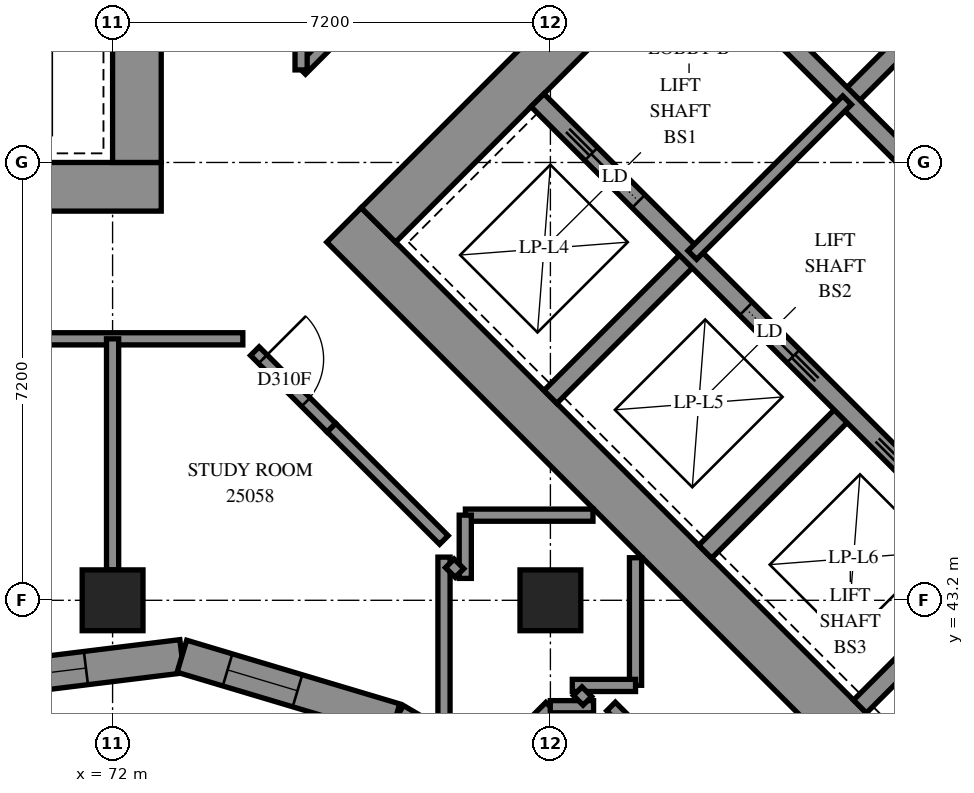
"""IFC4 building model, lengths in metres.
Left out: names, types, materials, properties, quantities, classifications, styles, units other than length and angle.
Written with IfcOpenShell. Run it as: python <this file> out.ifc"""

import sys

from ifc_helpers import new_model, si_unit, direction, frame, frame_2d, origin, origin_2d, place, context, subcontext, project, spatial, polyline, rectangle, outline, extrude, element, fill, save


model = new_model("IFC4")
c1 = context("Model", 3, precision=1e-05, world=origin(), true_north=direction((0.0, 1.0)))
c2 = subcontext(c1, "Body", "Model", "MODEL_VIEW")
j1 = project(units=[si_unit("LENGTHUNIT", "METRE"), si_unit("PLANEANGLEUNIT", "RADIAN")], contexts=[c1])
p1 = place(None, origin())
s1 = spatial("IfcSite", under=j1, at=p1, CompositionType="ELEMENT")
p2 = place(p1, origin())
s2 = spatial("IfcBuilding", under=s1, at=p2, CompositionType="ELEMENT")
p3 = place(p2, frame((0.0, 0.0, 94.8)))
s3 = spatial("IfcBuildingStorey", under=s2, at=p3, CompositionType="ELEMENT", Elevation=94.8)
for number, where, z_axis, x_axis in (
    (1, (72.0, 43.2, 0.0), (0.0, 0.0, 1.0), (1.0, 0.0, 0.0)),
    (2, (79.2, 43.2, 0.0), (0.0, 0.0, 1.0), (1.0, 0.0, 0.0)),
):
    element("IfcColumn", number, at=place(p3, frame(where, z_axis=z_axis, x_axis=x_axis)), inside=s3, PredefinedType="COLUMN", context=c2, shape_type="SweptSolid", body=[
        extrude(rectangle(XDim=1.0, YDim=1.0, at=origin_2d()), origin(), (0.0, 0.0, 1.0), 3.1),
    ])
p4 = place(p3, frame((56.8, 50.0, -0.3), z_axis=(0.0, 0.0, 1.0), x_axis=(1.0, 0.0, 0.0)))
e3 = element("IfcWall", 3, at=p4, inside=s3, PredefinedType="SHEAR", context=c2, shape_type="SweptSolid", body=[
    extrude(rectangle(XDim=16.0, YDim=0.8, at=frame_2d((8.0, 0.0))), origin(), (0.0, 0.0, 1.0), 2.7),
])
p5 = place(p3, frame((72.4, 50.4, -0.3), z_axis=(0.0, 0.0, 1.0), x_axis=(0.0, 1.0, 0.0)))
e4 = element("IfcWall", 4, at=p5, inside=s3, PredefinedType="SHEAR", context=c2, shape_type="SweptSolid", body=[
    extrude(rectangle(XDim=14.4, YDim=0.8, at=frame_2d((7.2, 0.0))), origin(), (0.0, 0.0, 1.0), 2.7),
])
p6 = place(p5, frame((4.55, 0.0, 0.3)))
e5 = element("IfcOpeningElement", 5, at=p6, cuts=e4, PredefinedType="OPENING", context=c2, shape_type="SweptSolid", body=[
    extrude(rectangle(XDim=1.1, YDim=2.1, at=frame_2d((0.55, 1.05))), frame((0.0, 0.41, 0.0), z_axis=(0.0, -1.0, 0.0), x_axis=(1.0, 0.0, 0.0)), (0.0, 0.0, 1.0), 0.82),
])
p7 = place(p5, frame((11.35, 0.0, 0.3)))
e6 = element("IfcOpeningElement", 6, at=p7, cuts=e4, PredefinedType="OPENING", context=c2, shape_type="SweptSolid", body=[
    extrude(rectangle(XDim=1.1, YDim=2.1, at=frame_2d((0.55, 1.05))), frame((0.0, 0.41, 0.0), z_axis=(0.0, -1.0, 0.0), x_axis=(1.0, 0.0, 0.0)), (0.0, 0.0, 1.0), 0.82),
])
p8 = place(p3, frame((75.806, 49.373, -0.3), z_axis=(0.0, 0.0, 1.0), x_axis=(0.7071067812, -0.7071067812, 0.0)))
e7 = element("IfcWall", 7, at=p8, inside=s3, PredefinedType="SHEAR", context=c2, shape_type="SweptSolid", body=[
    extrude(rectangle(XDim=16.0, YDim=0.8, at=frame_2d((8.0, 0.0))), origin(), (0.0, 0.0, 1.0), 2.7),
])
p9 = place(p3, frame((76.372, 49.373, -0.3), z_axis=(0.0, 0.0, 1.0), x_axis=(0.7071067812, 0.7071067812, 0.0)))
e8 = element("IfcWall", 8, at=p9, inside=s3, PredefinedType="SHEAR", context=c2, shape_type="SweptSolid", body=[
    extrude(rectangle(XDim=14.4, YDim=0.8, at=frame_2d((7.2, 0.0))), origin(), (0.0, 0.0, 1.0), 2.7),
])
p10 = place(p9, frame((4.55, 0.0, 0.3)))
e9 = element("IfcOpeningElement", 9, at=p10, cuts=e8, PredefinedType="OPENING", context=c2, shape_type="SweptSolid", body=[
    extrude(rectangle(XDim=1.1, YDim=2.1, at=frame_2d((0.55, 1.05))), frame((0.0, 0.41, 0.0), z_axis=(0.0, -1.0, 0.0), x_axis=(1.0, 0.0, 0.0)), (0.0, 0.0, 1.0), 0.82),
])
p11 = place(p9, frame((11.35, 0.0, 0.3)))
e10 = element("IfcOpeningElement", 10, at=p11, cuts=e8, PredefinedType="OPENING", context=c2, shape_type="SweptSolid", body=[
    extrude(rectangle(XDim=1.1, YDim=2.1, at=frame_2d((0.55, 1.05))), frame((0.0, 0.41, 0.0), z_axis=(0.0, -1.0, 0.0), x_axis=(1.0, 0.0, 0.0)), (0.0, 0.0, 1.0), 0.82),
])
for number, where, z_axis, x_axis in (
    (11, (79.2, 46.544, 0.0), (0.0, 0.0, 1.0), (0.707, 0.707, 0.0)),
    (12, (84.079, 51.423, 0.0), (0.0, 0.0, 1.0), (0.707, 0.707, 0.0)),
):
    element("IfcWall", number, at=place(p3, frame(where, z_axis=z_axis, x_axis=x_axis)), inside=s3, PredefinedType="SOLIDWALL", context=c2, shape_type="SweptSolid", body=[
        extrude(rectangle(XDim=3.3, YDim=0.3, at=frame_2d((1.65, 0.0))), origin(), (0.0, 0.0, 1.0), 3.1),
    ])
for number, where, z_axis, x_axis in (
    (13, (81.746, 43.999, 0.0), (0.0, 0.0, 1.0), (0.707, 0.707, 0.0)),
    (14, (84.291, 41.453, 0.0), (0.0, 0.0, 1.0), (0.707, 0.707, 0.0)),
):
    element("IfcWall", number, at=place(p3, frame(where, z_axis=z_axis, x_axis=x_axis)), inside=s3, PredefinedType="SOLIDWALL", context=c2, shape_type="SweptSolid", body=[
        extrude(rectangle(XDim=3.3, YDim=0.3, at=frame_2d((1.65, 0.0))), origin(), (0.0, 0.0, 1.0), 3.1),
    ])
p12 = place(p3, frame((78.988, 51.423, 0.0), z_axis=(0.0, 0.0, 1.0), x_axis=(0.7071067812, -0.7071067812, 0.0)))
e15 = element("IfcWall", 15, at=p12, inside=s3, PredefinedType="SOLIDWALL", context=c2, shape_type="SweptSolid", body=[
    extrude(rectangle(XDim=14.4, YDim=0.3, at=frame_2d((7.2, 0.0))), origin(), (0.0, 0.0, 1.0), 3.1),
])
p13 = place(p12, frame((1.25, 0.0, 0.0)))
e16 = element("IfcOpeningElement", 16, at=p13, cuts=e15, PredefinedType="OPENING", context=c2, shape_type="SweptSolid", body=[
    extrude(rectangle(XDim=1.1, YDim=2.1, at=frame_2d((0.55, 1.05))), frame((0.0, 0.16, 0.0), z_axis=(0.0, -1.0, 0.0), x_axis=(1.0, 0.0, 0.0)), (0.0, 0.0, 1.0), 0.32),
])
p14 = place(p12, frame((4.85, 0.0, 0.0)))
e17 = element("IfcOpeningElement", 17, at=p14, cuts=e15, PredefinedType="OPENING", context=c2, shape_type="SweptSolid", body=[
    extrude(rectangle(XDim=1.1, YDim=2.1, at=frame_2d((0.55, 1.05))), frame((0.0, 0.16, 0.0), z_axis=(0.0, -1.0, 0.0), x_axis=(1.0, 0.0, 0.0)), (0.0, 0.0, 1.0), 0.32),
])
p15 = place(p12, frame((8.45, 0.0, 0.0)))
e18 = element("IfcOpeningElement", 18, at=p15, cuts=e15, PredefinedType="OPENING", context=c2, shape_type="SweptSolid", body=[
    extrude(rectangle(XDim=1.1, YDim=2.1, at=frame_2d((0.55, 1.05))), frame((0.0, 0.16, 0.0), z_axis=(0.0, -1.0, 0.0), x_axis=(1.0, 0.0, 0.0)), (0.0, 0.0, 1.0), 0.32),
])
p16 = place(p12, frame((12.05, 0.0, 0.0)))
e19 = element("IfcOpeningElement", 19, at=p16, cuts=e15, PredefinedType="OPENING", context=c2, shape_type="SweptSolid", body=[
    extrude(rectangle(XDim=1.1, YDim=2.1, at=frame_2d((0.55, 1.05))), frame((0.0, 0.16, 0.0), z_axis=(0.0, -1.0, 0.0), x_axis=(1.0, 0.0, 0.0)), (0.0, 0.0, 1.0), 0.32),
])
p17 = place(p3, frame((81.534, 53.969, 0.0), z_axis=(0.0, 0.0, 1.0), x_axis=(0.707103309, -0.7071102534, 0.0)))
e20 = element("IfcWall", 20, at=p17, inside=s3, PredefinedType="SOLIDWALL", context=c2, shape_type="SweptSolid", body=[
    extrude(rectangle(XDim=14.4, YDim=0.3, at=frame_2d((7.2, 0.0))), origin(), (0.0, 0.0, 1.0), 3.1),
])
p18 = place(p17, frame((12.05, 0.0, 0.0)))
e21 = element("IfcOpeningElement", 21, at=p18, cuts=e20, PredefinedType="OPENING", context=c2, shape_type="SweptSolid", body=[
    extrude(rectangle(XDim=1.1, YDim=2.1, at=frame_2d((0.55, 1.05))), frame((0.0, 0.16, 0.0), z_axis=(0.0, -1.0, 0.0), x_axis=(1.0, 0.0, 0.0)), (0.0, 0.0, 1.0), 0.32),
])
p19 = place(p3, frame((83.867, 56.302, 0.0), z_axis=(0.0, 0.0, 1.0), x_axis=(0.7071137256, -0.7070998367, 0.0)))
e22 = element("IfcWall", 22, at=p19, inside=s3, PredefinedType="SOLIDWALL", context=c2, shape_type="SweptSolid", body=[
    extrude(rectangle(XDim=7.2, YDim=0.3, at=frame_2d((3.6, 0.0))), origin(), (0.0, 0.0, 1.0), 3.1),
])
p20 = place(p3, frame((69.7, 41.856, 0.0), z_axis=(0.0, 0.0, 1.0), x_axis=(0.9924938351, 0.1222946738, 0.0)))
e23 = element("IfcWall", 23, at=p20, inside=s3, PredefinedType="SOLIDWALL", context=c2, shape_type="SweptSolid", body=[
    extrude(outline(polyline([(-0.034, -0.275), (3.409, -0.275), (3.524, 0.275), (0.034, 0.275), (-0.034, -0.275)])), origin(), (0.0, 0.0, 1.0), 3.1),
])
p21 = place(p20, frame((0.676, 0.0, 0.5)))
e24 = element("IfcOpeningElement", 24, at=p21, cuts=e23, PredefinedType="OPENING", context=c2, shape_type="SweptSolid", body=[
    extrude(rectangle(XDim=1.2, YDim=2.45, at=frame_2d((0.6, 1.225))), frame((0.0, 0.285, 0.0), z_axis=(0.0, -1.0, 0.0), x_axis=(1.0, 0.0, 0.0)), (0.0, 0.0, 1.0), 0.57),
])
p22 = place(p3, frame((73.14, 42.28, 0.0), z_axis=(0.0, 0.0, 1.0), x_axis=(0.9581298103, -0.286334187, 0.0)))
e25 = element("IfcWall", 25, at=p22, inside=s3, PredefinedType="SOLIDWALL", context=c2, shape_type="SweptSolid", body=[
    extrude(outline(polyline([(0.058, -0.275), (3.623, -0.275), (3.69, 0.275), (-0.058, 0.275), (0.058, -0.275)])), origin(), (0.0, 0.0, 1.0), 3.1),
])
p23 = place(p22, frame((0.784, 0.0, 0.5)))
e26 = element("IfcOpeningElement", 26, at=p23, cuts=e25, PredefinedType="OPENING", context=c2, shape_type="SweptSolid", body=[
    extrude(rectangle(XDim=1.2, YDim=2.45, at=frame_2d((0.6, 1.225))), frame((0.0, 0.285, 0.0), z_axis=(0.0, -1.0, 0.0), x_axis=(1.0, 0.0, 0.0)), (0.0, 0.0, 1.0), 0.57),
])
p24 = place(p3, frame((76.644, 41.233, 0.0), z_axis=(0.0, 0.0, 1.0), x_axis=(0.861767211, -0.5073039267, 0.0)))
e27 = element("IfcWall", 27, at=p24, inside=s3, PredefinedType="SOLIDWALL", context=c2, shape_type="SweptSolid", body=[
    extrude(outline(polyline([(0.033, -0.275), (4.107, -0.275), (4.207, 0.275), (-0.033, 0.275), (0.033, -0.275)])), origin(), (0.0, 0.0, 1.0), 3.1),
])
p25 = place(p24, frame((0.353, 0.0, 0.5)))
e28 = element("IfcOpeningElement", 28, at=p25, cuts=e27, PredefinedType="OPENING", context=c2, shape_type="SweptSolid", body=[
    extrude(rectangle(XDim=1.2, YDim=2.45, at=frame_2d((0.6, 1.225))), frame((0.0, 0.285, 0.0), z_axis=(0.0, -1.0, 0.0), x_axis=(1.0, 0.0, 0.0)), (0.0, 0.0, 1.0), 0.57),
])
p26 = place(p24, frame((2.232, 0.0, 0.5)))
e29 = element("IfcOpeningElement", 29, at=p26, cuts=e27, PredefinedType="OPENING", context=c2, shape_type="SweptSolid", body=[
    extrude(rectangle(XDim=1.2, YDim=2.45, at=frame_2d((0.6, 1.225))), frame((0.0, 0.285, 0.0), z_axis=(0.0, -1.0, 0.0), x_axis=(1.0, 0.0, 0.0)), (0.0, 0.0, 1.0), 0.57),
])
p27 = place(p3, frame((81.534, 48.878, 0.0), z_axis=(0.0, 0.0, 1.0), x_axis=(0.707092892, 0.7071206701, 0.0)))
e30 = element("IfcWall", 30, at=p27, inside=s3, PredefinedType="PARTITIONING", context=c2, shape_type="SweptSolid", body=[
    extrude(rectangle(XDim=3.6, YDim=0.2, at=frame_2d((1.8, 0.0))), origin(), (0.0, 0.0, 1.0), 3.1),
])
p28 = place(p3, frame((54.7, 47.5, 0.0), z_axis=(0.0, 0.0, 1.0), x_axis=(1.0, 0.0, 0.0)))
e31 = element("IfcWall", 31, at=p28, inside=s3, PredefinedType="PARTITIONING", context=c2, shape_type="SweptSolid", body=[
    extrude(rectangle(XDim=19.442, YDim=0.2, at=frame_2d((9.721, 0.0))), origin(), (0.0, 0.0, 1.0), 3.1),
])
p29 = place(p28, frame((5.2, 0.0, 0.0)))
e32 = element("IfcOpeningElement", 32, at=p29, cuts=e31, PredefinedType="OPENING", context=c2, shape_type="SweptSolid", body=[
    extrude(rectangle(XDim=0.9, YDim=2.1, at=frame_2d((0.45, 1.05))), frame((0.0, 0.11, 0.0), z_axis=(0.0, -1.0, 0.0), x_axis=(1.0, 0.0, 0.0)), (0.0, 0.0, 1.0), 0.22),
])
p30 = place(p28, frame((6.9, 0.0, 0.0)))
e33 = element("IfcOpeningElement", 33, at=p30, cuts=e31, PredefinedType="OPENING", context=c2, shape_type="SweptSolid", body=[
    extrude(rectangle(XDim=0.9, YDim=2.1, at=frame_2d((0.45, 1.05))), frame((0.0, 0.11, 0.0), z_axis=(0.0, -1.0, 0.0), x_axis=(1.0, 0.0, 0.0)), (0.0, 0.0, 1.0), 0.22),
])
p31 = place(p28, frame((13.963, 0.0, 0.0)))
e34 = element("IfcOpeningElement", 34, at=p31, cuts=e31, PredefinedType="OPENING", context=c2, shape_type="SweptSolid", body=[
    extrude(rectangle(XDim=1.0, YDim=2.1, at=frame_2d((0.5, 1.05))), frame((0.0, 0.11, 0.0), z_axis=(0.0, -1.0, 0.0), x_axis=(1.0, 0.0, 0.0)), (0.0, 0.0, 1.0), 0.22),
])
p32 = place(p3, frame((80.197, 41.453, 0.0), z_axis=(0.0, 0.0, 1.0), x_axis=(0.7071067812, -0.7071067812, 0.0)))
e35 = element("IfcWall", 35, at=p32, inside=s3, PredefinedType="PARTITIONING", context=c2, shape_type="SweptSolid", body=[
    extrude(rectangle(XDim=6.488, YDim=0.2, at=frame_2d((3.244, 0.0))), origin(), (0.0, 0.0, 1.0), 3.1),
])
p33 = place(p3, frame((72.0, 43.7, 0.0), z_axis=(0.0, 0.0, 1.0), x_axis=(0.0, 1.0, 0.0)))
e36 = element("IfcWall", 36, at=p33, inside=s3, PredefinedType="PARTITIONING", context=c2, shape_type="SweptSolid", body=[
    extrude(rectangle(XDim=3.8, YDim=0.2, at=frame_2d((1.9, 0.0))), origin(), (0.0, 0.0, 1.0), 3.1),
])
p34 = place(p3, frame((77.45, 41.077, 0.0), z_axis=(0.0, 0.0, 1.0), x_axis=(0.0, 1.0, 0.0)))
e37 = element("IfcWall", 37, at=p34, inside=s3, PredefinedType="PARTITIONING", context=c2, shape_type="SweptSolid", body=[
    extrude(rectangle(XDim=2.833, YDim=0.2, at=frame_2d((1.416, 0.0))), origin(), (0.0, 0.0, 1.0), 3.1),
])
p35 = place(p3, frame((75.598, 46.04, 0.0), z_axis=(0.0, 0.0, 1.0), x_axis=(0.7074891043, -0.7067242512, 0.0)))
e38 = element("IfcWall", 38, at=p35, inside=s3, PredefinedType="PARTITIONING", context=c2, shape_type="SweptSolid", body=[
    extrude(rectangle(XDim=2.615, YDim=0.2, at=frame_2d((1.308, 0.0))), origin(), (0.0, 0.0, 1.0), 3.1),
])
p36 = place(p3, frame((75.102, 51.922, 0.0), z_axis=(0.0, 0.0, 1.0), x_axis=(0.7071067812, 0.7071067812, 0.0)))
e39 = element("IfcWall", 39, at=p36, inside=s3, PredefinedType="PARTITIONING", context=c2, shape_type="SweptSolid", body=[
    extrude(rectangle(XDim=2.514, YDim=0.2, at=frame_2d((1.257, 0.0))), origin(), (0.0, 0.0, 1.0), 3.1),
])
for number, where, z_axis, x_axis in (
    (40, (77.802, 44.6, 0.0), (0.0, 0.0, 1.0), (1.0, 0.0, 0.0)),
    (41, (80.6, 41.802, 0.0), (0.0, 0.0, 1.0), (0.0, 1.0, 0.0)),
):
    element("IfcWall", number, at=place(p3, frame(where, z_axis=z_axis, x_axis=x_axis)), inside=s3, PredefinedType="PARTITIONING", context=c2, shape_type="SweptSolid", body=[
        extrude(rectangle(XDim=2.098, YDim=0.2, at=frame_2d((1.049, 0.0))), origin(), (0.0, 0.0, 1.0), 3.1),
    ])
p37 = place(p3, frame((74.339, 47.297, 0.0), z_axis=(0.0, 0.0, 1.0), x_axis=(0.7071067812, -0.7071067812, 0.0)))
e42 = element("IfcWall", 42, at=p37, inside=s3, PredefinedType="PARTITIONING", context=c2, shape_type="SweptSolid", body=[
    extrude(rectangle(XDim=1.779, YDim=0.2, at=frame_2d((0.889, 0.0))), origin(), (0.0, 0.0, 1.0), 3.1),
])
p38 = place(p37, frame((0.186, 0.0, 0.0)))
e43 = element("IfcOpeningElement", 43, at=p38, cuts=e42, PredefinedType="OPENING", context=c2, shape_type="SweptSolid", body=[
    extrude(rectangle(XDim=1.0, YDim=2.1, at=frame_2d((0.5, 1.05))), frame((0.0, 0.11, 0.0), z_axis=(0.0, -1.0, 0.0), x_axis=(1.0, 0.0, 0.0)), (0.0, 0.0, 1.0), 0.22),
])
p39 = place(p3, frame((75.1, 51.922, 0.0), z_axis=(0.0, 0.0, 1.0), x_axis=(0.0, 1.0, 0.0)))
e44 = element("IfcWall", 44, at=p39, inside=s3, PredefinedType="PARTITIONING", context=c2, shape_type="SweptSolid", body=[
    extrude(rectangle(XDim=1.778, YDim=0.2, at=frame_2d((0.889, 0.0))), origin(), (0.0, 0.0, 1.0), 3.1),
])
p40 = place(p3, frame((78.314, 40.569, 0.0), z_axis=(0.0, 0.0, 1.0), x_axis=(0.7071067812, 0.7071067812, 0.0)))
e45 = element("IfcWall", 45, at=p40, inside=s3, PredefinedType="PARTITIONING", context=c2, shape_type="SweptSolid", body=[
    extrude(rectangle(XDim=1.247, YDim=0.2, at=frame_2d((0.623, 0.0))), origin(), (0.0, 0.0, 1.0), 3.1),
])
for number, where, z_axis, x_axis in (
    (46, (77.8, 43.56, 0.0), (0.0, 0.0, 1.0), (0.0, 1.0, 0.0)),
    (47, (79.56, 41.8, 0.0), (0.0, 0.0, 1.0), (1.0, 0.0, 0.0)),
):
    element("IfcWall", number, at=place(p3, frame(where, z_axis=z_axis, x_axis=x_axis)), inside=s3, PredefinedType="PARTITIONING", context=c2, shape_type="SweptSolid", body=[
        extrude(rectangle(XDim=1.04, YDim=0.2, at=frame_2d((0.52, 0.0))), origin(), (0.0, 0.0, 1.0), 3.1),
    ])
p41 = place(p3, frame((79.198, 41.45, 0.0), z_axis=(0.0, 0.0, 1.0), x_axis=(1.0, 0.0, 0.0)))
e48 = element("IfcWall", 48, at=p41, inside=s3, PredefinedType="PARTITIONING", context=c2, shape_type="SweptSolid", body=[
    extrude(rectangle(XDim=0.712, YDim=0.2, at=frame_2d((0.356, 0.0))), origin(), (0.0, 0.0, 1.0), 3.1),
])
for number, where, z_axis, x_axis in (
    (49, (79.649, 41.705, 0.0), (0.0, 0.0, 1.0), (0.707, -0.707, 0.0)),
    (50, (77.546, 43.808, 0.0), (0.0, 0.0, 1.0), (0.707, -0.707, 0.0)),
):
    element("IfcWall", number, at=place(p3, frame(where, z_axis=z_axis, x_axis=x_axis)), inside=s3, PredefinedType="PARTITIONING", context=c2, shape_type="SweptSolid", body=[
        extrude(rectangle(XDim=0.225, YDim=0.2, at=frame_2d((0.112, 0.0))), origin(), (0.0, 0.0, 1.0), 3.1),
    ])
p42 = place(p21, origin())
e51 = element("IfcWindow", 51, at=p42, inside=s3, PartitioningType="SINGLE_PANEL", PredefinedType="WINDOW", context=c2, shape_type="SweptSolid", body=[
    extrude(rectangle(XDim=1.2, YDim=2.45, at=frame_2d((0.6, 1.225))), frame((0.0, 0.155, 0.0), z_axis=(0.0, -1.0, 0.0), x_axis=(1.0, 0.0, 0.0)), (0.0, 0.0, 1.0), 0.06),
])
fill(e24, e51)
p43 = place(p23, origin())
e52 = element("IfcWindow", 52, at=p43, inside=s3, PartitioningType="SINGLE_PANEL", PredefinedType="WINDOW", context=c2, shape_type="SweptSolid", body=[
    extrude(rectangle(XDim=1.2, YDim=2.45, at=frame_2d((0.6, 1.225))), frame((0.0, 0.155, 0.0), z_axis=(0.0, -1.0, 0.0), x_axis=(1.0, 0.0, 0.0)), (0.0, 0.0, 1.0), 0.06),
])
fill(e26, e52)
p44 = place(p13, origin())
e53 = element("IfcDoor", 53, at=p44, inside=s3, OperationType="SLIDING_TO_LEFT", PredefinedType="DOOR", context=c2, shape_type="SweptSolid", body=[
    extrude(rectangle(XDim=1.1, YDim=2.1, at=frame_2d((0.55, 1.05))), frame((0.0, 0.025, 0.0), z_axis=(0.0, -1.0, 0.0), x_axis=(1.0, 0.0, 0.0)), (0.0, 0.0, 1.0), 0.05),
])
fill(e16, e53)
p45 = place(p14, origin())
e54 = element("IfcDoor", 54, at=p45, inside=s3, OperationType="SLIDING_TO_RIGHT", PredefinedType="DOOR", context=c2, shape_type="SweptSolid", body=[
    extrude(rectangle(XDim=1.1, YDim=2.1, at=frame_2d((0.55, 1.05))), frame((0.0, 0.025, 0.0), z_axis=(0.0, -1.0, 0.0), x_axis=(1.0, 0.0, 0.0)), (0.0, 0.0, 1.0), 0.05),
])
fill(e17, e54)
p46 = place(p38, origin())
e55 = element("IfcDoor", 55, at=p46, inside=s3, OperationType="SINGLE_SWING_LEFT", PredefinedType="DOOR", context=c2, shape_type="SweptSolid", body=[
    extrude(rectangle(XDim=1.0, YDim=2.1, at=frame_2d((0.5, 1.05))), frame((0.0, 0.025, 0.0), z_axis=(0.0, -1.0, 0.0), x_axis=(1.0, 0.0, 0.0)), (0.0, 0.0, 1.0), 0.05),
])
fill(e43, e55)
save(model, sys.argv[1])
